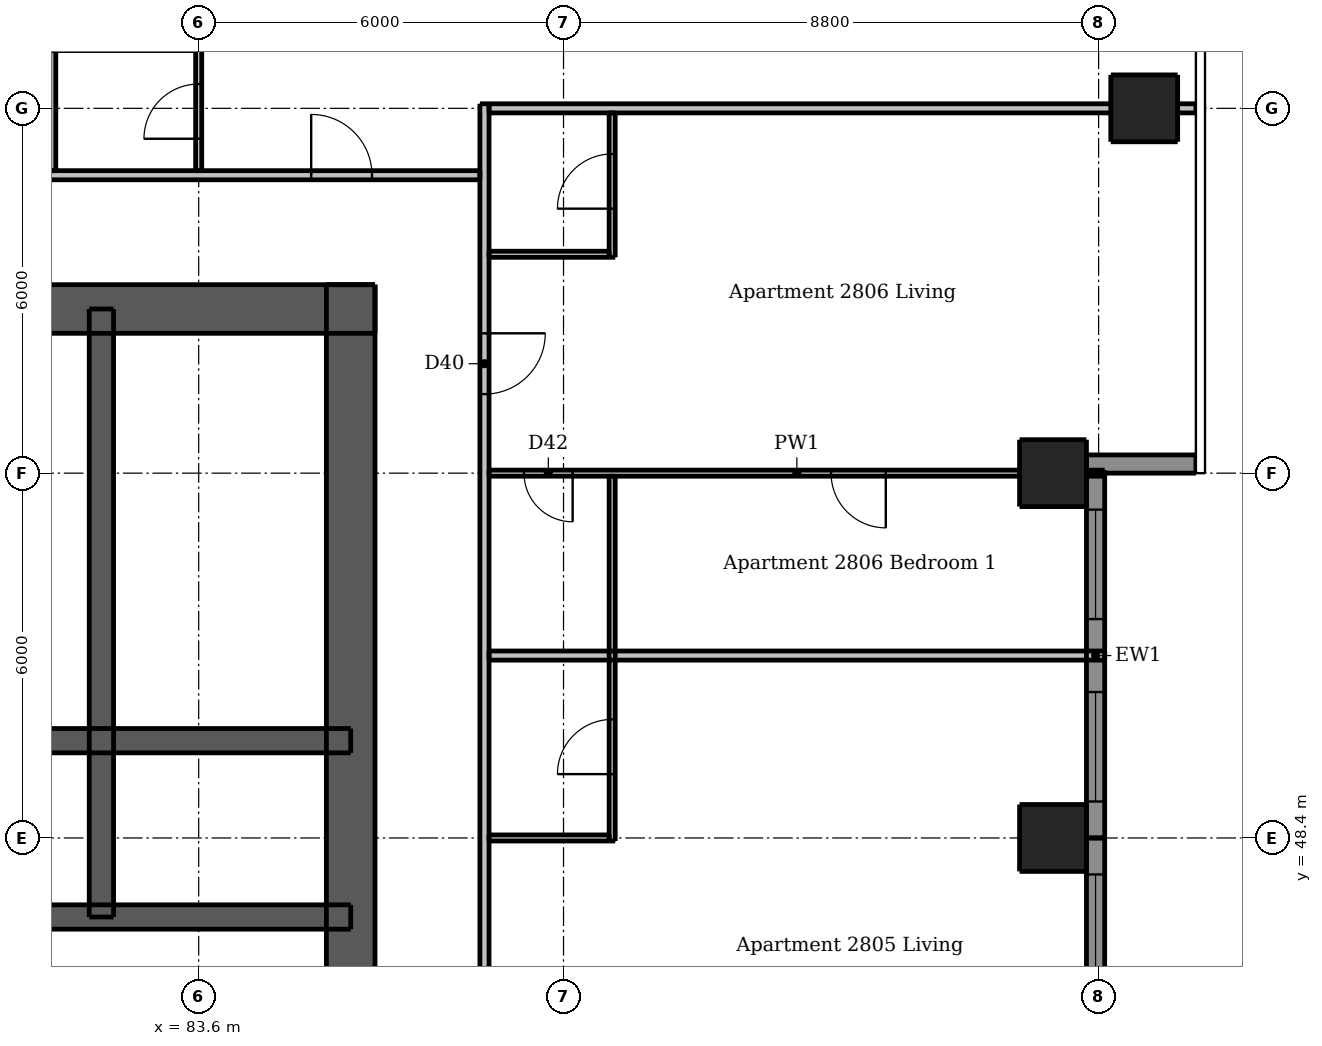
"""IFC4 building model, lengths in metres.
Left out: names, types, materials, properties, quantities, classifications, styles, units other than length and angle.
Written with IfcOpenShell. Run it as: python <this file> out.ifc"""

import sys

from ifc_helpers import new_model, si_unit, direction, frame, frame_2d, origin, origin_2d, place, context, subcontext, project, spatial, rectangle, extrude, element, fill, save


model = new_model("IFC4")
c1 = context("Model", 3, precision=1e-05, world=origin(), true_north=direction((0.0, 1.0)))
c2 = subcontext(c1, "Body", "Model", "MODEL_VIEW")
j1 = project(units=[si_unit("LENGTHUNIT", "METRE"), si_unit("PLANEANGLEUNIT", "RADIAN")], contexts=[c1])
p1 = place(None, origin())
s1 = spatial("IfcSite", under=j1, at=p1, CompositionType="ELEMENT")
p2 = place(p1, origin())
s2 = spatial("IfcBuilding", under=s1, at=p2, CompositionType="ELEMENT")
p3 = place(p2, frame((0.0, 0.0, 105.1)))
s3 = spatial("IfcBuildingStorey", under=s2, at=p3, CompositionType="ELEMENT", Elevation=105.1)
p4 = place(p3, frame((62.5, 57.1, 0.0), z_axis=(0.0, 0.0, 1.0), x_axis=(1.0, 0.0, 0.0)))
e1 = element("IfcWall", 1, at=p4, inside=s3, PredefinedType="SHEAR", context=c2, shape_type="SweptSolid", body=[
    extrude(rectangle(XDim=24.0, YDim=0.8, at=frame_2d((12.0, 0.0))), origin(), (0.0, 0.0, 1.0), 3.05),
])
p5 = place(p4, frame((20.9, 0.0, 0.0)))
e2 = element("IfcOpeningElement", 2, at=p5, cuts=e1, PredefinedType="OPENING", context=c2, shape_type="SweptSolid", body=[
    extrude(rectangle(XDim=1.1, YDim=2.1, at=frame_2d((0.55, 1.05))), frame((0.0, 0.41, 0.0), z_axis=(0.0, -1.0, 0.0), x_axis=(1.0, 0.0, 0.0)), (0.0, 0.0, 1.0), 0.82),
])
p6 = place(p4, frame((2.0, 0.0, 0.0)))
e3 = element("IfcOpeningElement", 3, at=p6, cuts=e1, PredefinedType="OPENING", context=c2, shape_type="SweptSolid", body=[
    extrude(rectangle(XDim=1.1, YDim=2.1, at=frame_2d((0.55, 1.05))), frame((0.0, 0.41, 0.0), z_axis=(0.0, -1.0, 0.0), x_axis=(1.0, 0.0, 0.0)), (0.0, 0.0, 1.0), 0.82),
])
p7 = place(p4, frame((6.44, 0.0, 0.0)))
e4 = element("IfcOpeningElement", 4, at=p7, cuts=e1, PredefinedType="OPENING", context=c2, shape_type="SweptSolid", body=[
    extrude(rectangle(XDim=0.9, YDim=2.1, at=frame_2d((0.45, 1.05))), frame((0.0, 0.41, 0.0), z_axis=(0.0, -1.0, 0.0), x_axis=(1.0, 0.0, 0.0)), (0.0, 0.0, 1.0), 0.82),
])
p8 = place(p4, frame((13.74, 0.0, 0.0)))
e5 = element("IfcOpeningElement", 5, at=p8, cuts=e1, PredefinedType="OPENING", context=c2, shape_type="SweptSolid", body=[
    extrude(rectangle(XDim=0.9, YDim=2.1, at=frame_2d((0.45, 1.05))), frame((0.0, 0.41, 0.0), z_axis=(0.0, -1.0, 0.0), x_axis=(1.0, 0.0, 0.0)), (0.0, 0.0, 1.0), 0.82),
])
p9 = place(p3, frame((86.1, 33.5, 0.0), z_axis=(0.0, 0.0, 1.0), x_axis=(0.0, 1.0, 0.0)))
e6 = element("IfcWall", 6, at=p9, inside=s3, PredefinedType="SHEAR", context=c2, shape_type="SweptSolid", body=[
    extrude(rectangle(XDim=24.0, YDim=0.8, at=frame_2d((12.0, 0.0))), origin(), (0.0, 0.0, 1.0), 3.05),
])
p10 = place(p9, frame((11.2, 0.0, 0.0)))
e7 = element("IfcOpeningElement", 7, at=p10, cuts=e6, PredefinedType="OPENING", context=c2, shape_type="SweptSolid", body=[
    extrude(rectangle(XDim=1.6, YDim=2.1, at=frame_2d((0.8, 1.05))), frame((0.0, 0.41, 0.0), z_axis=(0.0, -1.0, 0.0), x_axis=(1.0, 0.0, 0.0)), (0.0, 0.0, 1.0), 0.82),
])
p11 = place(p3, frame((62.9, 47.1, 0.0), z_axis=(0.0, 0.0, 1.0), x_axis=(1.0, 0.0, 0.0)))
e8 = element("IfcWall", 8, at=p11, inside=s3, PredefinedType="SHEAR", context=c2, shape_type="SweptSolid", body=[
    extrude(rectangle(XDim=23.2, YDim=0.4, at=frame_2d((11.6, 0.0))), origin(), (0.0, 0.0, 1.0), 3.05),
])
p12 = place(p11, frame((1.07, 0.0, 0.0)))
e9 = element("IfcOpeningElement", 9, at=p12, cuts=e8, PredefinedType="OPENING", context=c2, shape_type="SweptSolid", body=[
    extrude(rectangle(XDim=0.9, YDim=2.1, at=frame_2d((0.45, 1.05))), frame((0.0, 0.21, 0.0), z_axis=(0.0, -1.0, 0.0), x_axis=(1.0, 0.0, 0.0)), (0.0, 0.0, 1.0), 0.42),
])
p13 = place(p11, frame((2.87, 0.0, 0.0)))
e10 = element("IfcOpeningElement", 10, at=p13, cuts=e8, PredefinedType="OPENING", context=c2, shape_type="SweptSolid", body=[
    extrude(rectangle(XDim=0.8, YDim=2.1, at=frame_2d((0.4, 1.05))), frame((0.0, 0.21, 0.0), z_axis=(0.0, -1.0, 0.0), x_axis=(1.0, 0.0, 0.0)), (0.0, 0.0, 1.0), 0.42),
])
p14 = place(p11, frame((20.6, 0.0, 0.0)))
e11 = element("IfcOpeningElement", 11, at=p14, cuts=e8, PredefinedType="OPENING", context=c2, shape_type="SweptSolid", body=[
    extrude(rectangle(XDim=0.9, YDim=2.1, at=frame_2d((0.45, 1.05))), frame((0.0, 0.21, 0.0), z_axis=(0.0, -1.0, 0.0), x_axis=(1.0, 0.0, 0.0)), (0.0, 0.0, 1.0), 0.42),
])
p15 = place(p3, frame((62.9, 50.0, 0.0), z_axis=(0.0, 0.0, 1.0), x_axis=(1.0, 0.0, 0.0)))
e12 = element("IfcWall", 12, at=p15, inside=s3, PredefinedType="SHEAR", context=c2, shape_type="SweptSolid", body=[
    extrude(rectangle(XDim=23.2, YDim=0.4, at=frame_2d((11.6, 0.0))), origin(), (0.0, 0.0, 1.0), 3.05),
])
p16 = place(p3, frame((82.0, 47.1, 0.0), z_axis=(0.0, 0.0, 1.0), x_axis=(0.0, 1.0, 0.0)))
e13 = element("IfcWall", 13, at=p16, inside=s3, PredefinedType="SHEAR", context=c2, shape_type="SweptSolid", body=[
    extrude(rectangle(XDim=10.0, YDim=0.4, at=frame_2d((5.0, 0.0))), origin(), (0.0, 0.0, 1.0), 3.05),
])
p17 = place(p3, frame((97.65, 48.4, 0.0), z_axis=(0.0, 0.0, 1.0), x_axis=(1.0, 0.0, 0.0)))
e14 = element("IfcColumn", 14, at=p17, inside=s3, PredefinedType="COLUMN", context=c2, shape_type="SweptSolid", body=[
    extrude(rectangle(XDim=1.1, YDim=1.1, at=origin_2d()), origin(), (0.0, 0.0, 1.0), 3.3),
])
for number, where, z_axis, x_axis in (
    (15, (97.65, 54.4, 0.0), (0.0, 0.0, 1.0), (1.0, 0.0, 0.0)),
    (16, (99.15, 60.4, 0.0), (0.0, 0.0, 1.0), (1.0, 0.0, 0.0)),
):
    element("IfcColumn", number, at=place(p3, frame(where, z_axis=z_axis, x_axis=x_axis)), inside=s3, PredefinedType="COLUMN", context=c2, shape_type="SweptSolid", body=[
        extrude(rectangle(XDim=1.1, YDim=1.1, at=origin_2d()), origin(), (0.0, 0.0, 1.0), 3.05),
    ])
p18 = place(p3, frame((98.2, 54.55, 0.0), z_axis=(0.0, 0.0, 1.0), x_axis=(1.0, 0.0, 0.0)))
e17 = element("IfcWall", 17, at=p18, inside=s3, PredefinedType="SOLIDWALL", context=c2, shape_type="SweptSolid", body=[
    extrude(rectangle(XDim=1.8, YDim=0.3, at=frame_2d((0.9, 0.0))), origin(), (0.0, 0.0, 1.0), 3.05),
])
p19 = place(p3, frame((98.35, 42.7, 0.0), z_axis=(0.0, 0.0, 1.0), x_axis=(0.0, 1.0, 0.0)))
e18 = element("IfcWall", 18, at=p19, inside=s3, PredefinedType="SOLIDWALL", context=c2, shape_type="SweptSolid", body=[
    extrude(rectangle(XDim=5.7, YDim=0.3, at=frame_2d((2.85, 0.0))), origin(), (0.0, 0.0, 1.0), 3.05),
])
p20 = place(p19, frame((0.3, 0.0, 0.15)))
e19 = element("IfcOpeningElement", 19, at=p20, cuts=e18, PredefinedType="OPENING", context=c2, shape_type="SweptSolid", body=[
    extrude(rectangle(XDim=1.8, YDim=2.1, at=frame_2d((0.9, 1.05))), frame((0.0, 0.16, 0.0), z_axis=(0.0, -1.0, 0.0), x_axis=(1.0, 0.0, 0.0)), (0.0, 0.0, 1.0), 0.32),
])
p21 = place(p19, frame((3.3, 0.0, 0.15)))
e20 = element("IfcOpeningElement", 20, at=p21, cuts=e18, PredefinedType="OPENING", context=c2, shape_type="SweptSolid", body=[
    extrude(rectangle(XDim=1.8, YDim=2.1, at=frame_2d((0.9, 1.05))), frame((0.0, 0.16, 0.0), z_axis=(0.0, -1.0, 0.0), x_axis=(1.0, 0.0, 0.0)), (0.0, 0.0, 1.0), 0.32),
])
p22 = place(p3, frame((98.35, 48.4, 0.0), z_axis=(0.0, 0.0, 1.0), x_axis=(0.0, 1.0, 0.0)))
e21 = element("IfcWall", 21, at=p22, inside=s3, PredefinedType="SOLIDWALL", context=c2, shape_type="SweptSolid", body=[
    extrude(rectangle(XDim=6.0, YDim=0.3, at=frame_2d((3.0, 0.0))), origin(), (0.0, 0.0, 1.0), 3.05),
])
p23 = place(p22, frame((0.6, 0.0, 0.15)))
e22 = element("IfcOpeningElement", 22, at=p23, cuts=e21, PredefinedType="OPENING", context=c2, shape_type="SweptSolid", body=[
    extrude(rectangle(XDim=1.8, YDim=2.1, at=frame_2d((0.9, 1.05))), frame((0.0, 0.16, 0.0), z_axis=(0.0, -1.0, 0.0), x_axis=(1.0, 0.0, 0.0)), (0.0, 0.0, 1.0), 0.32),
])
p24 = place(p22, frame((3.6, 0.0, 0.15)))
e23 = element("IfcOpeningElement", 23, at=p24, cuts=e21, PredefinedType="OPENING", context=c2, shape_type="SweptSolid", body=[
    extrude(rectangle(XDim=1.8, YDim=2.1, at=frame_2d((0.9, 1.05))), frame((0.0, 0.16, 0.0), z_axis=(0.0, -1.0, 0.0), x_axis=(1.0, 0.0, 0.0)), (0.0, 0.0, 1.0), 0.32),
])
p25 = place(p3, frame((81.2, 59.375, 0.0), z_axis=(0.0, 0.0, 1.0), x_axis=(0.0, 1.0, 0.0)))
e24 = element("IfcWall", 24, at=p25, inside=s3, PredefinedType="PARTITIONING", context=c2, shape_type="SweptSolid", body=[
    extrude(rectangle(XDim=1.975, YDim=0.1, at=frame_2d((0.988, 0.0))), origin(), (0.0, 0.0, 1.0), 3.05),
])
p26 = place(p3, frame((83.6, 59.375, 0.0), z_axis=(0.0, 0.0, 1.0), x_axis=(0.0, 1.0, 0.0)))
e25 = element("IfcWall", 25, at=p26, inside=s3, PredefinedType="PARTITIONING", context=c2, shape_type="SweptSolid", body=[
    extrude(rectangle(XDim=8.625, YDim=0.1, at=frame_2d((4.312, 0.0))), origin(), (0.0, 0.0, 1.0), 2.516),
])
p27 = place(p26, frame((0.525, 0.0, 0.0)))
e26 = element("IfcOpeningElement", 26, at=p27, cuts=e25, PredefinedType="OPENING", context=c2, shape_type="SweptSolid", body=[
    extrude(rectangle(XDim=0.9, YDim=2.1, at=frame_2d((0.45, 1.05))), frame((0.0, 0.06, 0.0), z_axis=(0.0, -1.0, 0.0), x_axis=(1.0, 0.0, 0.0)), (0.0, 0.0, 1.0), 0.12),
])
p28 = place(p26, frame((4.875, 0.0, 0.0)))
e27 = element("IfcOpeningElement", 27, at=p28, cuts=e25, PredefinedType="OPENING", context=c2, shape_type="SweptSolid", body=[
    extrude(rectangle(XDim=0.9, YDim=2.1, at=frame_2d((0.45, 1.05))), frame((0.0, 0.06, 0.0), z_axis=(0.0, -1.0, 0.0), x_axis=(1.0, 0.0, 0.0)), (0.0, 0.0, 1.0), 0.12),
])
p29 = place(p3, frame((90.4, 48.35, 0.0), z_axis=(0.0, 0.0, 1.0), x_axis=(0.0, 1.0, 0.0)))
e28 = element("IfcWall", 28, at=p29, inside=s3, PredefinedType="PARTITIONING", context=c2, shape_type="SweptSolid", body=[
    extrude(rectangle(XDim=6.0, YDim=0.1, at=frame_2d((3.0, 0.0))), origin(), (0.0, 0.0, 1.0), 3.05),
])
p30 = place(p29, frame((1.1, 0.0, 0.0)))
e29 = element("IfcOpeningElement", 29, at=p30, cuts=e28, PredefinedType="OPENING", context=c2, shape_type="SweptSolid", body=[
    extrude(rectangle(XDim=0.9, YDim=2.1, at=frame_2d((0.45, 1.05))), frame((0.0, 0.06, 0.0), z_axis=(0.0, -1.0, 0.0), x_axis=(1.0, 0.0, 0.0)), (0.0, 0.0, 1.0), 0.12),
])
p31 = place(p3, frame((90.4, 57.95, 0.0), z_axis=(0.0, 0.0, 1.0), x_axis=(0.0, 1.0, 0.0)))
e30 = element("IfcWall", 30, at=p31, inside=s3, PredefinedType="PARTITIONING", context=c2, shape_type="SweptSolid", body=[
    extrude(rectangle(XDim=2.375, YDim=0.1, at=frame_2d((1.188, 0.0))), origin(), (0.0, 0.0, 1.0), 3.05),
])
p32 = place(p31, frame((0.8, 0.0, 0.0)))
e31 = element("IfcOpeningElement", 31, at=p32, cuts=e30, PredefinedType="OPENING", context=c2, shape_type="SweptSolid", body=[
    extrude(rectangle(XDim=0.9, YDim=2.1, at=frame_2d((0.45, 1.05))), frame((0.0, 0.06, 0.0), z_axis=(0.0, -1.0, 0.0), x_axis=(1.0, 0.0, 0.0)), (0.0, 0.0, 1.0), 0.12),
])
p33 = place(p3, frame((88.375, 58.0, 0.0), z_axis=(0.0, 0.0, 1.0), x_axis=(1.0, 0.0, 0.0)))
e32 = element("IfcWall", 32, at=p33, inside=s3, PredefinedType="PARTITIONING", context=c2, shape_type="SweptSolid", body=[
    extrude(rectangle(XDim=1.975, YDim=0.1, at=frame_2d((0.988, 0.0))), origin(), (0.0, 0.0, 1.0), 3.05),
])
p34 = place(p3, frame((98.5, 54.4, 0.0), z_axis=(0.0, 0.0, 1.0), x_axis=(-1.0, 0.0, 0.0)))
e33 = element("IfcWall", 33, at=p34, inside=s3, PredefinedType="PARTITIONING", context=c2, shape_type="SweptSolid", body=[
    extrude(rectangle(XDim=10.125, YDim=0.1, at=frame_2d((5.062, 0.0))), origin(), (0.0, 0.0, 1.0), 2.516),
])
p35 = place(p34, frame((3.6, 0.0, 0.0)))
e34 = element("IfcOpeningElement", 34, at=p35, cuts=e33, PredefinedType="OPENING", context=c2, shape_type="SweptSolid", body=[
    extrude(rectangle(XDim=0.9, YDim=2.1, at=frame_2d((0.45, 1.05))), frame((0.0, 0.06, 0.0), z_axis=(0.0, -1.0, 0.0), x_axis=(1.0, 0.0, 0.0)), (0.0, 0.0, 1.0), 0.12),
])
p36 = place(p34, frame((8.75, 0.0, 0.0)))
e35 = element("IfcOpeningElement", 35, at=p36, cuts=e33, PredefinedType="OPENING", context=c2, shape_type="SweptSolid", body=[
    extrude(rectangle(XDim=0.8, YDim=2.1, at=frame_2d((0.4, 1.05))), frame((0.0, 0.06, 0.0), z_axis=(0.0, -1.0, 0.0), x_axis=(1.0, 0.0, 0.0)), (0.0, 0.0, 1.0), 0.12),
])
p37 = place(p3, frame((88.375, 48.4, 0.0), z_axis=(0.0, 0.0, 1.0), x_axis=(1.0, 0.0, 0.0)))
e36 = element("IfcWall", 36, at=p37, inside=s3, PredefinedType="PARTITIONING", context=c2, shape_type="SweptSolid", body=[
    extrude(rectangle(XDim=1.975, YDim=0.1, at=frame_2d((0.988, 0.0))), origin(), (0.0, 0.0, 1.0), 2.516),
])
p38 = place(p3, frame((88.3, 60.475, 0.0), z_axis=(0.0, 0.0, 1.0), x_axis=(0.0, -1.0, 0.0)))
e37 = element("IfcWall", 37, at=p38, inside=s3, PredefinedType="PARTITIONING", context=c2, shape_type="SweptSolid", body=[
    extrude(rectangle(XDim=28.7, YDim=0.15, at=frame_2d((14.35, 0.0))), origin(), (0.0, 0.0, 1.0), 3.05),
])
p39 = place(p38, frame((27.425, 0.0, 0.0)))
e38 = element("IfcOpeningElement", 38, at=p39, cuts=e37, PredefinedType="OPENING", context=c2, shape_type="SweptSolid", body=[
    extrude(rectangle(XDim=1.0, YDim=2.1, at=frame_2d((0.5, 1.05))), frame((0.0, 0.085, 0.0), z_axis=(0.0, -1.0, 0.0), x_axis=(1.0, 0.0, 0.0)), (0.0, 0.0, 1.0), 0.17),
])
p40 = place(p38, frame((14.575, 0.0, 0.0)))
e39 = element("IfcOpeningElement", 39, at=p40, cuts=e37, PredefinedType="OPENING", context=c2, shape_type="SweptSolid", body=[
    extrude(rectangle(XDim=1.0, YDim=2.1, at=frame_2d((0.5, 1.05))), frame((0.0, 0.085, 0.0), z_axis=(0.0, -1.0, 0.0), x_axis=(1.0, 0.0, 0.0)), (0.0, 0.0, 1.0), 0.17),
])
p41 = place(p38, frame((3.775, 0.0, 0.0)))
e40 = element("IfcOpeningElement", 40, at=p41, cuts=e37, PredefinedType="OPENING", context=c2, shape_type="SweptSolid", body=[
    extrude(rectangle(XDim=1.0, YDim=2.1, at=frame_2d((0.5, 1.05))), frame((0.0, 0.085, 0.0), z_axis=(0.0, -1.0, 0.0), x_axis=(1.0, 0.0, 0.0)), (0.0, 0.0, 1.0), 0.17),
])
p42 = place(p3, frame((88.375, 60.4, 0.0), z_axis=(0.0, 0.0, 1.0), x_axis=(1.0, 0.0, 0.0)))
e41 = element("IfcWall", 41, at=p42, inside=s3, PredefinedType="PARTITIONING", context=c2, shape_type="SweptSolid", body=[
    extrude(rectangle(XDim=11.625, YDim=0.15, at=frame_2d((5.812, 0.0))), origin(), (0.0, 0.0, 1.0), 2.516),
])
p43 = place(p3, frame((59.675, 59.3, 0.0), z_axis=(0.0, 0.0, 1.0), x_axis=(1.0, 0.0, 0.0)))
e42 = element("IfcWall", 42, at=p43, inside=s3, PredefinedType="PARTITIONING", context=c2, shape_type="SweptSolid", body=[
    extrude(rectangle(XDim=28.55, YDim=0.15, at=frame_2d((14.275, 0.0))), origin(), (0.0, 0.0, 1.0), 3.05),
])
p44 = place(p43, frame((3.625, 0.0, 0.0)))
e43 = element("IfcOpeningElement", 43, at=p44, cuts=e42, PredefinedType="OPENING", context=c2, shape_type="SweptSolid", body=[
    extrude(rectangle(XDim=1.0, YDim=2.1, at=frame_2d((0.5, 1.05))), frame((0.0, 0.085, 0.0), z_axis=(0.0, -1.0, 0.0), x_axis=(1.0, 0.0, 0.0)), (0.0, 0.0, 1.0), 0.17),
])
p45 = place(p43, frame((14.425, 0.0, 0.0)))
e44 = element("IfcOpeningElement", 44, at=p45, cuts=e42, PredefinedType="OPENING", context=c2, shape_type="SweptSolid", body=[
    extrude(rectangle(XDim=1.0, YDim=2.1, at=frame_2d((0.5, 1.05))), frame((0.0, 0.085, 0.0), z_axis=(0.0, -1.0, 0.0), x_axis=(1.0, 0.0, 0.0)), (0.0, 0.0, 1.0), 0.17),
])
p46 = place(p43, frame((25.775, 0.0, 0.0)))
e45 = element("IfcOpeningElement", 45, at=p46, cuts=e42, PredefinedType="OPENING", context=c2, shape_type="SweptSolid", body=[
    extrude(rectangle(XDim=1.0, YDim=2.1, at=frame_2d((0.5, 1.05))), frame((0.0, 0.085, 0.0), z_axis=(0.0, -1.0, 0.0), x_axis=(1.0, 0.0, 0.0)), (0.0, 0.0, 1.0), 0.17),
])
p47 = place(p3, frame((88.375, 51.4, 0.0), z_axis=(0.0, 0.0, 1.0), x_axis=(1.0, 0.0, 0.0)))
e46 = element("IfcWall", 46, at=p47, inside=s3, PredefinedType="PARTITIONING", context=c2, shape_type="SweptSolid", body=[
    extrude(rectangle(XDim=10.125, YDim=0.15, at=frame_2d((5.062, 0.0))), origin(), (0.0, 0.0, 1.0), 3.05),
])
p48 = place(p21, origin())
e47 = element("IfcWindow", 47, at=p48, inside=s3, PartitioningType="DOUBLE_PANEL_VERTICAL", PredefinedType="WINDOW", context=c2, shape_type="SweptSolid", body=[
    extrude(rectangle(XDim=1.8, YDim=2.1, at=frame_2d((0.9, 1.05))), frame((0.0, 0.03, 0.0), z_axis=(0.0, -1.0, 0.0), x_axis=(1.0, 0.0, 0.0)), (0.0, 0.0, 1.0), 0.06),
])
fill(e20, e47)
p49 = place(p23, origin())
e48 = element("IfcWindow", 48, at=p49, inside=s3, PartitioningType="DOUBLE_PANEL_VERTICAL", PredefinedType="WINDOW", context=c2, shape_type="SweptSolid", body=[
    extrude(rectangle(XDim=1.8, YDim=2.1, at=frame_2d((0.9, 1.05))), frame((0.0, 0.03, 0.0), z_axis=(0.0, -1.0, 0.0), x_axis=(1.0, 0.0, 0.0)), (0.0, 0.0, 1.0), 0.06),
])
fill(e22, e48)
p50 = place(p24, origin())
e49 = element("IfcWindow", 49, at=p50, inside=s3, PartitioningType="DOUBLE_PANEL_VERTICAL", PredefinedType="WINDOW", context=c2, shape_type="SweptSolid", body=[
    extrude(rectangle(XDim=1.8, YDim=2.1, at=frame_2d((0.9, 1.05))), frame((0.0, 0.03, 0.0), z_axis=(0.0, -1.0, 0.0), x_axis=(1.0, 0.0, 0.0)), (0.0, 0.0, 1.0), 0.06),
])
fill(e23, e49)
p51 = place(p5, origin())
e50 = element("IfcDoor", 50, at=p51, inside=s3, OperationType="SINGLE_SWING_RIGHT", PredefinedType="DOOR", context=c2, shape_type="SweptSolid", body=[
    extrude(rectangle(XDim=1.1, YDim=2.1, at=frame_2d((0.55, 1.05))), frame((0.0, -0.337, 0.0), z_axis=(0.0, -1.0, 0.0), x_axis=(1.0, 0.0, 0.0)), (0.0, 0.0, 1.0), 0.05),
])
fill(e2, e50)
p52 = place(p14, origin())
e51 = element("IfcDoor", 51, at=p52, inside=s3, OperationType="SINGLE_SWING_LEFT", PredefinedType="DOOR", context=c2, shape_type="SweptSolid", body=[
    extrude(rectangle(XDim=0.9, YDim=2.1, at=frame_2d((0.45, 1.05))), frame((0.0, 0.188, 0.0), z_axis=(0.0, -1.0, 0.0), x_axis=(1.0, 0.0, 0.0)), (0.0, 0.0, 1.0), 0.05),
])
fill(e11, e51)
p53 = place(p30, origin())
e52 = element("IfcDoor", 52, at=p53, inside=s3, OperationType="SINGLE_SWING_LEFT", PredefinedType="DOOR", context=c2, shape_type="SweptSolid", body=[
    extrude(rectangle(XDim=0.9, YDim=2.1, at=frame_2d((0.45, 1.05))), frame((0.0, 0.025, 0.0), z_axis=(0.0, -1.0, 0.0), x_axis=(1.0, 0.0, 0.0)), (0.0, 0.0, 1.0), 0.05),
])
fill(e29, e52)
p54 = place(p41, origin())
e53 = element("IfcDoor", 53, at=p54, inside=s3, OperationType="SINGLE_SWING_LEFT", PredefinedType="DOOR", context=c2, shape_type="SweptSolid", body=[
    extrude(rectangle(XDim=1.0, YDim=2.1, at=frame_2d((0.5, 1.05))), frame((0.0, 0.025, 0.0), z_axis=(0.0, -1.0, 0.0), x_axis=(1.0, 0.0, 0.0)), (0.0, 0.0, 1.0), 0.05),
])
fill(e40, e53)
p55 = place(p32, origin())
e54 = element("IfcDoor", 54, at=p55, inside=s3, OperationType="SINGLE_SWING_LEFT", PredefinedType="DOOR", context=c2, shape_type="SweptSolid", body=[
    extrude(rectangle(XDim=0.9, YDim=2.1, at=frame_2d((0.45, 1.05))), frame((0.0, 0.025, 0.0), z_axis=(0.0, -1.0, 0.0), x_axis=(1.0, 0.0, 0.0)), (0.0, 0.0, 1.0), 0.05),
])
fill(e31, e54)
p56 = place(p35, origin())
e55 = element("IfcDoor", 55, at=p56, inside=s3, OperationType="SINGLE_SWING_LEFT", PredefinedType="DOOR", context=c2, shape_type="SweptSolid", body=[
    extrude(rectangle(XDim=0.9, YDim=2.1, at=frame_2d((0.45, 1.05))), frame((0.0, 0.025, 0.0), z_axis=(0.0, -1.0, 0.0), x_axis=(1.0, 0.0, 0.0)), (0.0, 0.0, 1.0), 0.05),
])
fill(e34, e55)
p57 = place(p36, origin())
e56 = element("IfcDoor", 56, at=p57, inside=s3, OperationType="SINGLE_SWING_LEFT", PredefinedType="DOOR", context=c2, shape_type="SweptSolid", body=[
    extrude(rectangle(XDim=0.8, YDim=2.1, at=frame_2d((0.4, 1.05))), frame((0.0, 0.025, 0.0), z_axis=(0.0, -1.0, 0.0), x_axis=(1.0, 0.0, 0.0)), (0.0, 0.0, 1.0), 0.05),
])
fill(e35, e56)
p58 = place(p46, origin())
e57 = element("IfcDoor", 57, at=p58, inside=s3, OperationType="SINGLE_SWING_LEFT", PredefinedType="DOOR", context=c2, shape_type="SweptSolid", body=[
    extrude(rectangle(XDim=1.0, YDim=2.1, at=frame_2d((0.5, 1.05))), frame((0.0, 0.025, 0.0), z_axis=(0.0, -1.0, 0.0), x_axis=(1.0, 0.0, 0.0)), (0.0, 0.0, 1.0), 0.05),
])
fill(e45, e57)
p59 = place(p27, origin())
e58 = element("IfcDoor", 58, at=p59, inside=s3, OperationType="SINGLE_SWING_LEFT", PredefinedType="DOOR", context=c2, shape_type="SweptSolid", body=[
    extrude(rectangle(XDim=0.9, YDim=2.1, at=frame_2d((0.45, 1.05))), frame((0.0, 0.025, 0.0), z_axis=(0.0, -1.0, 0.0), x_axis=(1.0, 0.0, 0.0)), (0.0, 0.0, 1.0), 0.05),
])
fill(e26, e58)
save(model, sys.argv[1])
